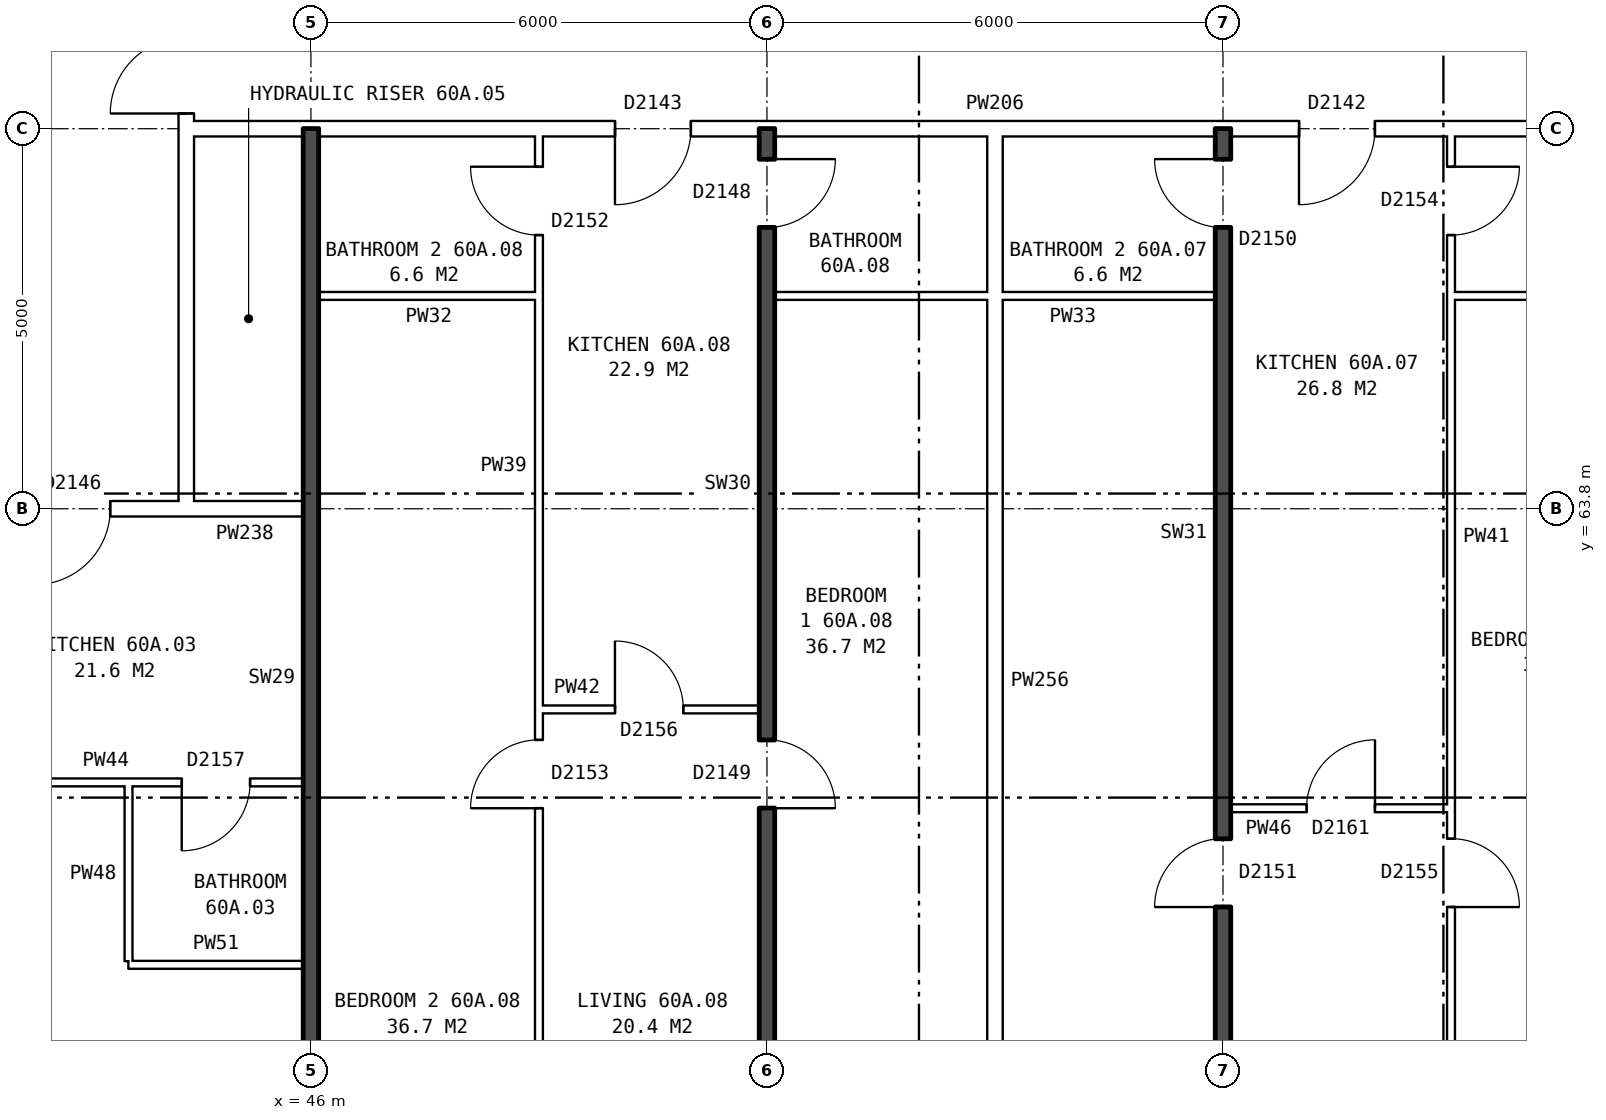
"""IFC4 building model, lengths in metres.
Left out: names, types, materials, properties, quantities, classifications, styles, units other than length and angle.
Written with IfcOpenShell. Run it as: python <this file> out.ifc"""

import sys

from ifc_helpers import new_model, si_unit, direction, frame, frame_2d, origin, place, context, subcontext, project, spatial, rectangle, extrude, element, fill, save


model = new_model("IFC4")
c1 = context("Model", 3, precision=1e-05, world=origin(), true_north=direction((0.0, 1.0)))
c2 = subcontext(c1, "Body", "Model", "MODEL_VIEW")
j1 = project(units=[si_unit("LENGTHUNIT", "METRE"), si_unit("PLANEANGLEUNIT", "RADIAN")], contexts=[c1])
p1 = place(None, origin())
s1 = spatial("IfcSite", under=j1, at=p1, CompositionType="ELEMENT")
p2 = place(p1, origin())
s2 = spatial("IfcBuilding", under=s1, at=p2, CompositionType="ELEMENT")
p3 = place(p2, frame((0.0, 0.0, 212.1)))
s3 = spatial("IfcBuildingStorey", under=s2, at=p3, CompositionType="ELEMENT", Elevation=212.1)
p4 = place(p3, frame((44.36, 63.9, 0.0), z_axis=(0.0, 0.0, 1.0), x_axis=(0.0, 1.0, 0.0)))
e1 = element("IfcWall", 1, at=p4, inside=s3, PredefinedType="PARTITIONING", context=c2, shape_type="SweptSolid", body=[
    extrude(rectangle(XDim=12.2, YDim=0.2, at=frame_2d((6.1, 0.0))), origin(), (0.0, 0.0, 1.0), 2.85),
])
p5 = place(p4, frame((5.1, 0.0, 0.0)))
e2 = element("IfcOpeningElement", 2, at=p5, cuts=e1, PredefinedType="OPENING", context=c2, shape_type="SweptSolid", body=[
    extrude(rectangle(XDim=2.0, YDim=2.1, at=frame_2d((1.0, 1.05))), frame((0.0, 0.11, 0.0), z_axis=(0.0, -1.0, 0.0), x_axis=(1.0, 0.0, 0.0)), (0.0, 0.0, 1.0), 0.22),
])
p6 = place(p3, frame((43.6, 57.8, 0.0), z_axis=(0.0, 0.0, 1.0), x_axis=(1.0, 0.0, 0.0)))
e3 = element("IfcWall", 3, at=p6, inside=s3, PredefinedType="PARTITIONING", context=c2, shape_type="SweptSolid", body=[
    extrude(rectangle(XDim=2.3, YDim=0.1, at=frame_2d((1.15, 0.0))), origin(), (0.0, 0.0, 1.0), 2.85),
])
p7 = place(p3, frame((58.1, 59.86, 0.0), z_axis=(0.0, 0.0, 1.0), x_axis=(1.0, 0.0, 0.0)))
e4 = element("IfcWall", 4, at=p7, inside=s3, PredefinedType="PARTITIONING", context=c2, shape_type="SweptSolid", body=[
    extrude(rectangle(XDim=2.9, YDim=0.1, at=frame_2d((1.45, 0.0))), origin(), (0.0, 0.0, 1.0), 2.85),
])
p8 = place(p7, frame((1.0, 0.0, 0.0)))
e5 = element("IfcOpeningElement", 5, at=p8, cuts=e4, PredefinedType="OPENING", context=c2, shape_type="SweptSolid", body=[
    extrude(rectangle(XDim=0.9, YDim=2.1, at=frame_2d((0.45, 1.05))), frame((0.0, 0.06, 0.0), z_axis=(0.0, -1.0, 0.0), x_axis=(1.0, 0.0, 0.0)), (0.0, 0.0, 1.0), 0.12),
])
p9 = place(p3, frame((40.1, 60.2, 0.0), z_axis=(0.0, 0.0, 1.0), x_axis=(1.0, 0.0, 0.0)))
e6 = element("IfcWall", 6, at=p9, inside=s3, PredefinedType="PARTITIONING", context=c2, shape_type="SweptSolid", body=[
    extrude(rectangle(XDim=5.8, YDim=0.1, at=frame_2d((2.9, 0.0))), origin(), (0.0, 0.0, 1.0), 2.85),
])
p10 = place(p9, frame((1.3, 0.0, 0.0)))
e7 = element("IfcOpeningElement", 7, at=p10, cuts=e6, PredefinedType="OPENING", context=c2, shape_type="SweptSolid", body=[
    extrude(rectangle(XDim=0.9, YDim=2.1, at=frame_2d((0.45, 1.05))), frame((0.0, 0.06, 0.0), z_axis=(0.0, -1.0, 0.0), x_axis=(1.0, 0.0, 0.0)), (0.0, 0.0, 1.0), 0.12),
])
p11 = place(p9, frame((4.2, 0.0, 0.0)))
e8 = element("IfcOpeningElement", 8, at=p11, cuts=e6, PredefinedType="OPENING", context=c2, shape_type="SweptSolid", body=[
    extrude(rectangle(XDim=0.9, YDim=2.1, at=frame_2d((0.45, 1.05))), frame((0.0, 0.06, 0.0), z_axis=(0.0, -1.0, 0.0), x_axis=(1.0, 0.0, 0.0)), (0.0, 0.0, 1.0), 0.12),
])
p12 = place(p3, frame((49.0, 61.16, 0.0), z_axis=(0.0, 0.0, 1.0), x_axis=(1.0, 0.0, 0.0)))
e9 = element("IfcWall", 9, at=p12, inside=s3, PredefinedType="PARTITIONING", context=c2, shape_type="SweptSolid", body=[
    extrude(rectangle(XDim=2.9, YDim=0.1, at=frame_2d((1.45, 0.0))), origin(), (0.0, 0.0, 1.0), 2.85),
])
p13 = place(p12, frame((1.0, 0.0, 0.0)))
e10 = element("IfcOpeningElement", 10, at=p13, cuts=e9, PredefinedType="OPENING", context=c2, shape_type="SweptSolid", body=[
    extrude(rectangle(XDim=0.9, YDim=2.1, at=frame_2d((0.45, 1.05))), frame((0.0, 0.06, 0.0), z_axis=(0.0, -1.0, 0.0), x_axis=(1.0, 0.0, 0.0)), (0.0, 0.0, 1.0), 0.12),
])
p14 = place(p3, frame((41.36, 63.8, 0.0), z_axis=(0.0, 0.0, 1.0), x_axis=(1.0, 0.0, 0.0)))
e11 = element("IfcWall", 11, at=p14, inside=s3, PredefinedType="PARTITIONING", context=c2, shape_type="SweptSolid", body=[
    extrude(rectangle(XDim=3.0, YDim=0.2, at=frame_2d((1.5, 0.0))), origin(), (0.0, 0.0, 1.0), 2.85),
])
p15 = place(p14, frame((1.0, 0.0, 0.0)))
e12 = element("IfcOpeningElement", 12, at=p15, cuts=e11, PredefinedType="OPENING", context=c2, shape_type="SweptSolid", body=[
    extrude(rectangle(XDim=1.0, YDim=2.1, at=frame_2d((0.5, 1.05))), frame((0.0, 0.11, 0.0), z_axis=(0.0, -1.0, 0.0), x_axis=(1.0, 0.0, 0.0)), (0.0, 0.0, 1.0), 0.22),
])
p16 = place(p3, frame((44.36, 63.8, 0.0), z_axis=(0.0, 0.0, 1.0), x_axis=(1.0, 0.0, 0.0)))
e13 = element("IfcWall", 13, at=p16, inside=s3, PredefinedType="PARTITIONING", context=c2, shape_type="SweptSolid", body=[
    extrude(rectangle(XDim=1.54, YDim=0.2, at=frame_2d((0.77, 0.0))), origin(), (0.0, 0.0, 1.0), 2.85),
])
p17 = place(p3, frame((46.1, 66.6, 0.0), z_axis=(0.0, 0.0, 1.0), x_axis=(1.0, 0.0, 0.0)))
e14 = element("IfcWall", 14, at=p17, inside=s3, PredefinedType="PARTITIONING", context=c2, shape_type="SweptSolid", body=[
    extrude(rectangle(XDim=2.9, YDim=0.1, at=frame_2d((1.45, 0.0))), origin(), (0.0, 0.0, 1.0), 2.85),
])
p18 = place(p3, frame((52.1, 66.6, 0.0), z_axis=(0.0, 0.0, 1.0), x_axis=(1.0, 0.0, 0.0)))
e15 = element("IfcWall", 15, at=p18, inside=s3, PredefinedType="PARTITIONING", context=c2, shape_type="SweptSolid", body=[
    extrude(rectangle(XDim=5.8, YDim=0.1, at=frame_2d((2.9, 0.0))), origin(), (0.0, 0.0, 1.0), 2.85),
])
p19 = place(p3, frame((61.0, 66.6, 0.0), z_axis=(0.0, 0.0, 1.0), x_axis=(1.0, 0.0, 0.0)))
e16 = element("IfcWall", 16, at=p19, inside=s3, PredefinedType="PARTITIONING", context=c2, shape_type="SweptSolid", body=[
    extrude(rectangle(XDim=2.64, YDim=0.1, at=frame_2d((1.32, 0.0))), origin(), (0.0, 0.0, 1.0), 2.85),
])
p20 = place(p3, frame((44.36, 68.8, 0.0), z_axis=(0.0, 0.0, 1.0), x_axis=(1.0, 0.0, 0.0)))
e17 = element("IfcWall", 17, at=p20, inside=s3, PredefinedType="PARTITIONING", context=c2, shape_type="SweptSolid", body=[
    extrude(rectangle(XDim=19.28, YDim=0.2, at=frame_2d((9.64, 0.0))), origin(), (0.0, 0.0, 1.0), 2.85),
])
p21 = place(p20, frame((14.64, 0.0, 0.0)))
e18 = element("IfcOpeningElement", 18, at=p21, cuts=e17, PredefinedType="OPENING", context=c2, shape_type="SweptSolid", body=[
    extrude(rectangle(XDim=1.0, YDim=2.1, at=frame_2d((0.5, 1.05))), frame((0.0, 0.11, 0.0), z_axis=(0.0, -1.0, 0.0), x_axis=(1.0, 0.0, 0.0)), (0.0, 0.0, 1.0), 0.22),
])
p22 = place(p20, frame((5.64, 0.0, 0.0)))
e19 = element("IfcOpeningElement", 19, at=p22, cuts=e17, PredefinedType="OPENING", context=c2, shape_type="SweptSolid", body=[
    extrude(rectangle(XDim=1.0, YDim=2.1, at=frame_2d((0.5, 1.05))), frame((0.0, 0.11, 0.0), z_axis=(0.0, -1.0, 0.0), x_axis=(1.0, 0.0, 0.0)), (0.0, 0.0, 1.0), 0.22),
])
p23 = place(p3, frame((43.6, 57.85, 0.0), z_axis=(0.0, 0.0, 1.0), x_axis=(0.0, 1.0, 0.0)))
e20 = element("IfcWall", 20, at=p23, inside=s3, PredefinedType="PARTITIONING", context=c2, shape_type="SweptSolid", body=[
    extrude(rectangle(XDim=2.3, YDim=0.1, at=frame_2d((1.15, 0.0))), origin(), (0.0, 0.0, 1.0), 2.85),
])
p24 = place(p3, frame((46.0, 54.36, 0.0), z_axis=(0.0, 0.0, 1.0), x_axis=(0.0, 1.0, 0.0)))
e21 = element("IfcWall", 21, at=p24, inside=s3, PredefinedType="SOLIDWALL", context=c2, shape_type="SweptSolid", body=[
    extrude(rectangle(XDim=14.44, YDim=0.2, at=frame_2d((7.22, 0.0))), origin(), (0.0, 0.0, 1.0), 2.85),
])
p25 = place(p3, frame((49.0, 54.36, 0.0), z_axis=(0.0, 0.0, 1.0), x_axis=(0.0, 1.0, 0.0)))
e22 = element("IfcWall", 22, at=p25, inside=s3, PredefinedType="PARTITIONING", context=c2, shape_type="SweptSolid", body=[
    extrude(rectangle(XDim=14.34, YDim=0.1, at=frame_2d((7.17, 0.0))), origin(), (0.0, 0.0, 1.0), 2.85),
])
p26 = place(p25, frame((5.5, 0.0, 0.0)))
e23 = element("IfcOpeningElement", 23, at=p26, cuts=e22, PredefinedType="OPENING", context=c2, shape_type="SweptSolid", body=[
    extrude(rectangle(XDim=0.9, YDim=2.1, at=frame_2d((0.45, 1.05))), frame((0.0, 0.06, 0.0), z_axis=(0.0, -1.0, 0.0), x_axis=(1.0, 0.0, 0.0)), (0.0, 0.0, 1.0), 0.12),
])
p27 = place(p25, frame((13.04, 0.0, 0.0)))
e24 = element("IfcOpeningElement", 24, at=p27, cuts=e22, PredefinedType="OPENING", context=c2, shape_type="SweptSolid", body=[
    extrude(rectangle(XDim=0.9, YDim=2.1, at=frame_2d((0.45, 1.05))), frame((0.0, 0.06, 0.0), z_axis=(0.0, -1.0, 0.0), x_axis=(1.0, 0.0, 0.0)), (0.0, 0.0, 1.0), 0.12),
])
p28 = place(p3, frame((52.0, 54.36, 0.0), z_axis=(0.0, 0.0, 1.0), x_axis=(0.0, 1.0, 0.0)))
e25 = element("IfcWall", 25, at=p28, inside=s3, PredefinedType="SOLIDWALL", context=c2, shape_type="SweptSolid", body=[
    extrude(rectangle(XDim=14.44, YDim=0.2, at=frame_2d((7.22, 0.0))), origin(), (0.0, 0.0, 1.0), 2.85),
])
p29 = place(p28, frame((5.5, 0.0, 0.0)))
e26 = element("IfcOpeningElement", 26, at=p29, cuts=e25, PredefinedType="OPENING", context=c2, shape_type="SweptSolid", body=[
    extrude(rectangle(XDim=0.9, YDim=2.1, at=frame_2d((0.45, 1.05))), frame((0.0, 0.11, 0.0), z_axis=(0.0, -1.0, 0.0), x_axis=(1.0, 0.0, 0.0)), (0.0, 0.0, 1.0), 0.22),
])
p30 = place(p28, frame((13.14, 0.0, 0.0)))
e27 = element("IfcOpeningElement", 27, at=p30, cuts=e25, PredefinedType="OPENING", context=c2, shape_type="SweptSolid", body=[
    extrude(rectangle(XDim=0.9, YDim=2.1, at=frame_2d((0.45, 1.05))), frame((0.0, 0.11, 0.0), z_axis=(0.0, -1.0, 0.0), x_axis=(1.0, 0.0, 0.0)), (0.0, 0.0, 1.0), 0.22),
])
p31 = place(p3, frame((55.0, 54.36, 0.0), z_axis=(0.0, 0.0, 1.0), x_axis=(0.0, 1.0, 0.0)))
e28 = element("IfcWall", 28, at=p31, inside=s3, PredefinedType="PARTITIONING", context=c2, shape_type="SweptSolid", body=[
    extrude(rectangle(XDim=14.34, YDim=0.2, at=frame_2d((7.17, 0.0))), origin(), (0.0, 0.0, 1.0), 2.85),
])
p32 = place(p3, frame((58.0, 54.36, 0.0), z_axis=(0.0, 0.0, 1.0), x_axis=(0.0, 1.0, 0.0)))
e29 = element("IfcWall", 29, at=p32, inside=s3, PredefinedType="SOLIDWALL", context=c2, shape_type="SweptSolid", body=[
    extrude(rectangle(XDim=14.44, YDim=0.2, at=frame_2d((7.22, 0.0))), origin(), (0.0, 0.0, 1.0), 2.85),
])
p33 = place(p32, frame((4.2, 0.0, 0.0)))
e30 = element("IfcOpeningElement", 30, at=p33, cuts=e29, PredefinedType="OPENING", context=c2, shape_type="SweptSolid", body=[
    extrude(rectangle(XDim=0.9, YDim=2.1, at=frame_2d((0.45, 1.05))), frame((0.0, 0.11, 0.0), z_axis=(0.0, -1.0, 0.0), x_axis=(1.0, 0.0, 0.0)), (0.0, 0.0, 1.0), 0.22),
])
p34 = place(p32, frame((13.14, 0.0, 0.0)))
e31 = element("IfcOpeningElement", 31, at=p34, cuts=e29, PredefinedType="OPENING", context=c2, shape_type="SweptSolid", body=[
    extrude(rectangle(XDim=0.9, YDim=2.1, at=frame_2d((0.45, 1.05))), frame((0.0, 0.11, 0.0), z_axis=(0.0, -1.0, 0.0), x_axis=(1.0, 0.0, 0.0)), (0.0, 0.0, 1.0), 0.22),
])
p35 = place(p3, frame((61.0, 54.36, 0.0), z_axis=(0.0, 0.0, 1.0), x_axis=(0.0, 1.0, 0.0)))
e32 = element("IfcWall", 32, at=p35, inside=s3, PredefinedType="PARTITIONING", context=c2, shape_type="SweptSolid", body=[
    extrude(rectangle(XDim=14.34, YDim=0.1, at=frame_2d((7.17, 0.0))), origin(), (0.0, 0.0, 1.0), 2.85),
])
p36 = place(p35, frame((4.2, 0.0, 0.0)))
e33 = element("IfcOpeningElement", 33, at=p36, cuts=e32, PredefinedType="OPENING", context=c2, shape_type="SweptSolid", body=[
    extrude(rectangle(XDim=0.9, YDim=2.1, at=frame_2d((0.45, 1.05))), frame((0.0, 0.06, 0.0), z_axis=(0.0, -1.0, 0.0), x_axis=(1.0, 0.0, 0.0)), (0.0, 0.0, 1.0), 0.12),
])
p37 = place(p35, frame((13.04, 0.0, 0.0)))
e34 = element("IfcOpeningElement", 34, at=p37, cuts=e32, PredefinedType="OPENING", context=c2, shape_type="SweptSolid", body=[
    extrude(rectangle(XDim=0.9, YDim=2.1, at=frame_2d((0.45, 1.05))), frame((0.0, 0.06, 0.0), z_axis=(0.0, -1.0, 0.0), x_axis=(1.0, 0.0, 0.0)), (0.0, 0.0, 1.0), 0.12),
])
p38 = place(p5, origin())
e35 = element("IfcDoor", 35, at=p38, inside=s3, OperationType="DOUBLE_DOOR_SINGLE_SWING", PredefinedType="DOOR", context=c2, shape_type="SweptSolid", body=[
    extrude(rectangle(XDim=2.0, YDim=2.1, at=frame_2d((1.0, 1.05))), frame((0.0, 0.025, 0.0), z_axis=(0.0, -1.0, 0.0), x_axis=(1.0, 0.0, 0.0)), (0.0, 0.0, 1.0), 0.05),
])
fill(e2, e35)
p39 = place(p15, frame((1.0, 0.0, 0.0), z_axis=(0.0, 0.0, 1.0), x_axis=(-1.0, 0.0, 0.0)))
e36 = element("IfcDoor", 36, at=p39, inside=s3, OperationType="SINGLE_SWING_RIGHT", PredefinedType="DOOR", context=c2, shape_type="SweptSolid", body=[
    extrude(rectangle(XDim=1.0, YDim=2.1, at=frame_2d((0.5, 1.05))), frame((0.0, 0.025, 0.0), z_axis=(0.0, -1.0, 0.0), x_axis=(1.0, 0.0, 0.0)), (0.0, 0.0, 1.0), 0.05),
])
fill(e12, e36)
p40 = place(p11, frame((0.9, 0.0, 0.0), z_axis=(0.0, 0.0, 1.0), x_axis=(-1.0, 0.0, 0.0)))
e37 = element("IfcDoor", 37, at=p40, inside=s3, OperationType="SINGLE_SWING_RIGHT", PredefinedType="DOOR", context=c2, shape_type="SweptSolid", body=[
    extrude(rectangle(XDim=0.9, YDim=2.1, at=frame_2d((0.45, 1.05))), frame((0.0, 0.025, 0.0), z_axis=(0.0, -1.0, 0.0), x_axis=(1.0, 0.0, 0.0)), (0.0, 0.0, 1.0), 0.05),
])
fill(e8, e37)
p41 = place(p36, frame((0.9, 0.0, 0.0), z_axis=(0.0, 0.0, 1.0), x_axis=(-1.0, 0.0, 0.0)))
e38 = element("IfcDoor", 38, at=p41, inside=s3, OperationType="SINGLE_SWING_RIGHT", PredefinedType="DOOR", context=c2, shape_type="SweptSolid", body=[
    extrude(rectangle(XDim=0.9, YDim=2.1, at=frame_2d((0.45, 1.05))), frame((0.0, 0.025, 0.0), z_axis=(0.0, -1.0, 0.0), x_axis=(1.0, 0.0, 0.0)), (0.0, 0.0, 1.0), 0.05),
])
fill(e33, e38)
p42 = place(p33, origin())
e39 = element("IfcDoor", 39, at=p42, inside=s3, OperationType="SINGLE_SWING_LEFT", PredefinedType="DOOR", context=c2, shape_type="SweptSolid", body=[
    extrude(rectangle(XDim=0.9, YDim=2.1, at=frame_2d((0.45, 1.05))), frame((0.0, 0.025, 0.0), z_axis=(0.0, -1.0, 0.0), x_axis=(1.0, 0.0, 0.0)), (0.0, 0.0, 1.0), 0.05),
])
fill(e30, e39)
p43 = place(p21, frame((1.0, 0.0, 0.0), z_axis=(0.0, 0.0, 1.0), x_axis=(-1.0, 0.0, 0.0)))
e40 = element("IfcDoor", 40, at=p43, inside=s3, OperationType="SINGLE_SWING_RIGHT", PredefinedType="DOOR", context=c2, shape_type="SweptSolid", body=[
    extrude(rectangle(XDim=1.0, YDim=2.1, at=frame_2d((0.5, 1.05))), frame((0.0, 0.025, 0.0), z_axis=(0.0, -1.0, 0.0), x_axis=(1.0, 0.0, 0.0)), (0.0, 0.0, 1.0), 0.05),
])
fill(e18, e40)
p44 = place(p8, origin())
e41 = element("IfcDoor", 41, at=p44, inside=s3, OperationType="SINGLE_SWING_RIGHT", PredefinedType="DOOR", context=c2, shape_type="SweptSolid", body=[
    extrude(rectangle(XDim=0.9, YDim=2.1, at=frame_2d((0.45, 1.05))), frame((0.0, 0.025, 0.0), z_axis=(0.0, -1.0, 0.0), x_axis=(1.0, 0.0, 0.0)), (0.0, 0.0, 1.0), 0.05),
])
fill(e5, e41)
p45 = place(p37, frame((0.9, 0.0, 0.0), z_axis=(0.0, 0.0, 1.0), x_axis=(-1.0, 0.0, 0.0)))
e42 = element("IfcDoor", 42, at=p45, inside=s3, OperationType="SINGLE_SWING_LEFT", PredefinedType="DOOR", context=c2, shape_type="SweptSolid", body=[
    extrude(rectangle(XDim=0.9, YDim=2.1, at=frame_2d((0.45, 1.05))), frame((0.0, 0.025, 0.0), z_axis=(0.0, -1.0, 0.0), x_axis=(1.0, 0.0, 0.0)), (0.0, 0.0, 1.0), 0.05),
])
fill(e34, e42)
p46 = place(p34, origin())
e43 = element("IfcDoor", 43, at=p46, inside=s3, OperationType="SINGLE_SWING_RIGHT", PredefinedType="DOOR", context=c2, shape_type="SweptSolid", body=[
    extrude(rectangle(XDim=0.9, YDim=2.1, at=frame_2d((0.45, 1.05))), frame((0.0, 0.025, 0.0), z_axis=(0.0, -1.0, 0.0), x_axis=(1.0, 0.0, 0.0)), (0.0, 0.0, 1.0), 0.05),
])
fill(e31, e43)
p47 = place(p29, frame((0.9, 0.0, 0.0), z_axis=(0.0, 0.0, 1.0), x_axis=(-1.0, 0.0, 0.0)))
e44 = element("IfcDoor", 44, at=p47, inside=s3, OperationType="SINGLE_SWING_RIGHT", PredefinedType="DOOR", context=c2, shape_type="SweptSolid", body=[
    extrude(rectangle(XDim=0.9, YDim=2.1, at=frame_2d((0.45, 1.05))), frame((0.0, 0.025, 0.0), z_axis=(0.0, -1.0, 0.0), x_axis=(1.0, 0.0, 0.0)), (0.0, 0.0, 1.0), 0.05),
])
fill(e26, e44)
p48 = place(p26, origin())
e45 = element("IfcDoor", 45, at=p48, inside=s3, OperationType="SINGLE_SWING_LEFT", PredefinedType="DOOR", context=c2, shape_type="SweptSolid", body=[
    extrude(rectangle(XDim=0.9, YDim=2.1, at=frame_2d((0.45, 1.05))), frame((0.0, 0.025, 0.0), z_axis=(0.0, -1.0, 0.0), x_axis=(1.0, 0.0, 0.0)), (0.0, 0.0, 1.0), 0.05),
])
fill(e23, e45)
p49 = place(p22, frame((1.0, 0.0, 0.0), z_axis=(0.0, 0.0, 1.0), x_axis=(-1.0, 0.0, 0.0)))
e46 = element("IfcDoor", 46, at=p49, inside=s3, OperationType="SINGLE_SWING_RIGHT", PredefinedType="DOOR", context=c2, shape_type="SweptSolid", body=[
    extrude(rectangle(XDim=1.0, YDim=2.1, at=frame_2d((0.5, 1.05))), frame((0.0, 0.025, 0.0), z_axis=(0.0, -1.0, 0.0), x_axis=(1.0, 0.0, 0.0)), (0.0, 0.0, 1.0), 0.05),
])
fill(e19, e46)
p50 = place(p13, origin())
e47 = element("IfcDoor", 47, at=p50, inside=s3, OperationType="SINGLE_SWING_LEFT", PredefinedType="DOOR", context=c2, shape_type="SweptSolid", body=[
    extrude(rectangle(XDim=0.9, YDim=2.1, at=frame_2d((0.45, 1.05))), frame((0.0, 0.025, 0.0), z_axis=(0.0, -1.0, 0.0), x_axis=(1.0, 0.0, 0.0)), (0.0, 0.0, 1.0), 0.05),
])
fill(e10, e47)
p51 = place(p30, frame((0.9, 0.0, 0.0), z_axis=(0.0, 0.0, 1.0), x_axis=(-1.0, 0.0, 0.0)))
e48 = element("IfcDoor", 48, at=p51, inside=s3, OperationType="SINGLE_SWING_LEFT", PredefinedType="DOOR", context=c2, shape_type="SweptSolid", body=[
    extrude(rectangle(XDim=0.9, YDim=2.1, at=frame_2d((0.45, 1.05))), frame((0.0, 0.025, 0.0), z_axis=(0.0, -1.0, 0.0), x_axis=(1.0, 0.0, 0.0)), (0.0, 0.0, 1.0), 0.05),
])
fill(e27, e48)
p52 = place(p27, origin())
e49 = element("IfcDoor", 49, at=p52, inside=s3, OperationType="SINGLE_SWING_RIGHT", PredefinedType="DOOR", context=c2, shape_type="SweptSolid", body=[
    extrude(rectangle(XDim=0.9, YDim=2.1, at=frame_2d((0.45, 1.05))), frame((0.0, 0.025, 0.0), z_axis=(0.0, -1.0, 0.0), x_axis=(1.0, 0.0, 0.0)), (0.0, 0.0, 1.0), 0.05),
])
fill(e24, e49)
save(model, sys.argv[1])
